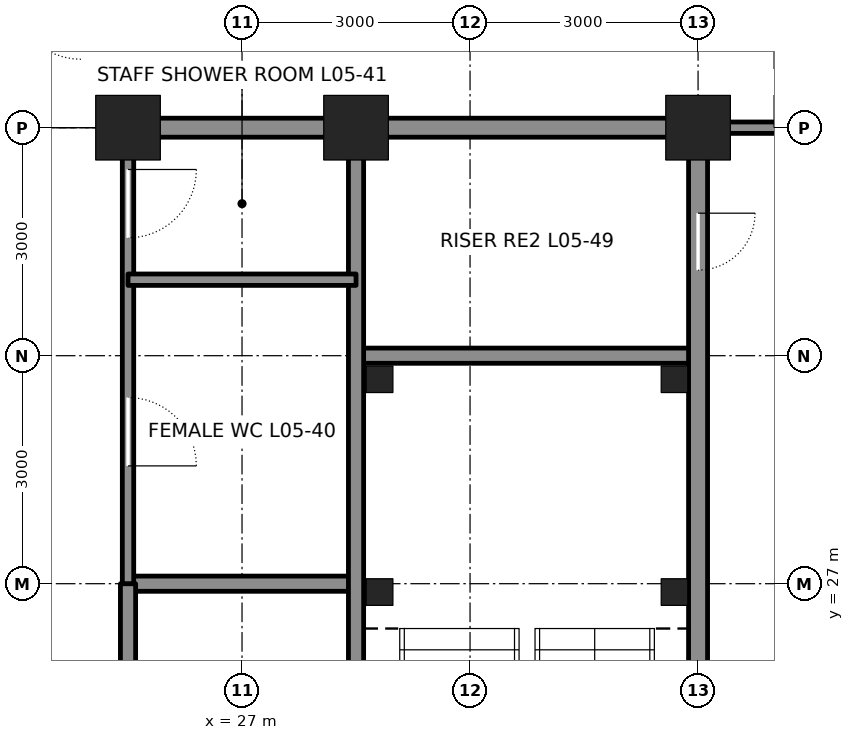
"""IFC4 building model, lengths in metres.
Left out: names, types, materials, properties, quantities, classifications, styles, units other than length and angle.
Written with IfcOpenShell. Run it as: python <this file> out.ifc"""

import sys

from ifc_helpers import new_model, si_unit, direction, frame, frame_2d, origin, origin_2d, place, context, subcontext, project, spatial, rectangle, hollow_rectangle, extrude, element, fill, save


model = new_model("IFC4")
c1 = context("Model", 3, precision=1e-05, world=origin(), true_north=direction((0.0, 1.0)))
c2 = subcontext(c1, "Body", "Model", "MODEL_VIEW")
j1 = project(units=[si_unit("LENGTHUNIT", "METRE"), si_unit("PLANEANGLEUNIT", "RADIAN")], contexts=[c1])
p1 = place(None, origin())
s1 = spatial("IfcSite", under=j1, at=p1, CompositionType="ELEMENT")
p2 = place(p1, origin())
s2 = spatial("IfcBuilding", under=s1, at=p2, CompositionType="ELEMENT")
p3 = place(p2, frame((0.0, 0.0, 28.8)))
s3 = spatial("IfcBuildingStorey", under=s2, at=p3, CompositionType="ELEMENT", Elevation=28.8)
for number, where, z_axis, x_axis in (
    (1, (25.5, 33.0, 0.0), (0.0, 0.0, 1.0), (1.0, 0.0, 0.0)),
    (2, (28.5, 33.0, 0.0), (0.0, 0.0, 1.0), (1.0, 0.0, 0.0)),
    (3, (33.0, 33.0, 0.0), (0.0, 0.0, 1.0), (1.0, 0.0, 0.0)),
):
    element("IfcColumn", number, at=place(p3, frame(where, z_axis=z_axis, x_axis=x_axis)), inside=s3, PredefinedType="COLUMN", context=c2, shape_type="SweptSolid", body=[
        extrude(hollow_rectangle(XDim=0.85, YDim=0.85, WallThickness=0.085, at=origin_2d()), origin(), (0.0, 0.0, 1.0), 4.5),
    ])
p4 = place(p3, frame((25.5, 27.0, 0.0), z_axis=(0.0, 0.0, 1.0), x_axis=(1.0, 0.0, 0.0)))
e4 = element("IfcWall", 4, at=p4, inside=s3, PredefinedType="SOLIDWALL", context=c2, shape_type="SweptSolid", body=[
    extrude(rectangle(XDim=3.0, YDim=0.2, at=frame_2d((1.5, 0.0))), origin(), (0.0, 0.0, 1.0), 4.34),
])
p5 = place(p3, frame((28.5, 30.0, 0.0), z_axis=(0.0, 0.0, 1.0), x_axis=(1.0, 0.0, 0.0)))
e5 = element("IfcWall", 5, at=p5, inside=s3, PredefinedType="SOLIDWALL", context=c2, shape_type="SweptSolid", body=[
    extrude(rectangle(XDim=4.5, YDim=0.2, at=frame_2d((2.25, 0.0))), origin(), (0.0, 0.0, 1.0), 4.34),
])
p6 = place(p3, frame((25.75, 33.0, 0.0), z_axis=(0.0, 0.0, 1.0), x_axis=(1.0, 0.0, 0.0)))
e6 = element("IfcWall", 6, at=p6, inside=s3, PredefinedType="SOLIDWALL", context=c2, shape_type="SweptSolid", body=[
    extrude(rectangle(XDim=2.5, YDim=0.25, at=frame_2d((1.25, 0.0))), origin(), (0.0, 0.0, 1.0), 3.181),
])
p7 = place(p3, frame((28.75, 33.0, 0.0), z_axis=(0.0, 0.0, 1.0), x_axis=(1.0, 0.0, 0.0)))
e7 = element("IfcWall", 7, at=p7, inside=s3, PredefinedType="SOLIDWALL", context=c2, shape_type="SweptSolid", body=[
    extrude(rectangle(XDim=4.0, YDim=0.25, at=frame_2d((2.0, 0.0))), origin(), (0.0, 0.0, 1.0), 3.181),
])
p8 = place(p3, frame((25.5, 15.0, 0.0), z_axis=(0.0, 0.0, 1.0), x_axis=(0.0, 1.0, 0.0)))
e8 = element("IfcWall", 8, at=p8, inside=s3, PredefinedType="SOLIDWALL", context=c2, shape_type="SweptSolid", body=[
    extrude(rectangle(XDim=12.0, YDim=0.2, at=frame_2d((6.0, 0.0))), origin(), (0.0, 0.0, 1.0), 3.365),
])
p9 = place(p3, frame((25.5, 27.0, 0.0), z_axis=(0.0, 0.0, 1.0), x_axis=(0.0, 1.0, 0.0)))
e9 = element("IfcWall", 9, at=p9, inside=s3, PredefinedType="PARTITIONING", context=c2, shape_type="SweptSolid", body=[
    extrude(rectangle(XDim=5.75, YDim=0.15, at=frame_2d((2.875, 0.0))), origin(), (0.0, 0.0, 1.0), 3.365),
])
p10 = place(p9, frame((1.55, 0.0, 0.0)))
e10 = element("IfcOpeningElement", 10, at=p10, cuts=e9, PredefinedType="OPENING", context=c2, shape_type="SweptSolid", body=[
    extrude(rectangle(XDim=0.9, YDim=2.1, at=frame_2d((0.45, 1.05))), frame((0.0, 0.085, 0.0), z_axis=(0.0, -1.0, 0.0), x_axis=(1.0, 0.0, 0.0)), (0.0, 0.0, 1.0), 0.17),
])
p11 = place(p9, frame((4.55, 0.0, 0.0)))
e11 = element("IfcOpeningElement", 11, at=p11, cuts=e9, PredefinedType="OPENING", context=c2, shape_type="SweptSolid", body=[
    extrude(rectangle(XDim=0.9, YDim=2.1, at=frame_2d((0.45, 1.05))), frame((0.0, 0.085, 0.0), z_axis=(0.0, -1.0, 0.0), x_axis=(1.0, 0.0, 0.0)), (0.0, 0.0, 1.0), 0.17),
])
p12 = place(p3, frame((28.5, 24.25, 0.0), z_axis=(0.0, 0.0, 1.0), x_axis=(0.0, 1.0, 0.0)))
e12 = element("IfcWall", 12, at=p12, inside=s3, PredefinedType="SOLIDWALL", context=c2, shape_type="SweptSolid", body=[
    extrude(rectangle(XDim=8.5, YDim=0.2, at=frame_2d((4.25, 0.0))), origin(), (0.0, 0.0, 1.0), 3.413),
])
p13 = place(p3, frame((33.0, 24.25, 0.0), z_axis=(0.0, 0.0, 1.0), x_axis=(0.0, 1.0, 0.0)))
e13 = element("IfcWall", 13, at=p13, inside=s3, PredefinedType="SOLIDWALL", context=c2, shape_type="SweptSolid", body=[
    extrude(rectangle(XDim=8.5, YDim=0.25, at=frame_2d((4.25, 0.0))), origin(), (0.0, 0.0, 1.0), 3.113),
])
p14 = place(p13, frame((6.875, 0.0, 0.0)))
e14 = element("IfcOpeningElement", 14, at=p14, cuts=e13, PredefinedType="OPENING", context=c2, shape_type="SweptSolid", body=[
    extrude(rectangle(XDim=0.75, YDim=2.1, at=frame_2d((0.375, 1.05))), frame((0.0, 0.135, 0.0), z_axis=(0.0, -1.0, 0.0), x_axis=(1.0, 0.0, 0.0)), (0.0, 0.0, 1.0), 0.27),
])
p15 = place(p3, frame((25.5, 31.0, 0.0), z_axis=(0.0, 0.0, 1.0), x_axis=(1.0, 0.0, 0.0)))
e15 = element("IfcWall", 15, at=p15, inside=s3, PredefinedType="PARTITIONING", context=c2, shape_type="SweptSolid", body=[
    extrude(rectangle(XDim=3.0, YDim=0.15, at=frame_2d((1.5, 0.0))), origin(), (0.0, 0.0, 1.0), 4.34),
])
p16 = place(p3, frame((33.0, 33.0, -0.3), z_axis=(0.0, 0.0, 1.0), x_axis=(1.0, 0.0, 0.0)))
e16 = element("IfcWall", 16, at=p16, inside=s3, PredefinedType="PARTITIONING", context=c2, shape_type="SweptSolid", body=[
    extrude(rectangle(XDim=3.0, YDim=0.15, at=frame_2d((1.5, 0.0))), origin(), (0.0, 0.0, 1.0), 3.481),
])
p17 = place(p16, frame((1.0, 0.0, 0.3)))
e17 = element("IfcOpeningElement", 17, at=p17, cuts=e16, PredefinedType="OPENING", context=c2, shape_type="SweptSolid", body=[
    extrude(rectangle(XDim=1.0, YDim=2.4, at=frame_2d((0.5, 1.2))), frame((0.0, 0.085, 0.0), z_axis=(0.0, -1.0, 0.0), x_axis=(1.0, 0.0, 0.0)), (0.0, 0.0, 1.0), 0.17),
])
for number, where, z_axis, x_axis in (
    (18, (28.81, 29.69, 0.0), (0.0, 0.0, 1.0), (1.0, 0.0, 0.0)),
    (19, (32.69, 29.69, 0.0), (0.0, 0.0, 1.0), (1.0, 0.0, 0.0)),
    (20, (28.81, 26.89, 0.0), (0.0, 0.0, 1.0), (1.0, 0.0, 0.0)),
    (21, (32.69, 26.89, 0.0), (0.0, 0.0, 1.0), (1.0, 0.0, 0.0)),
):
    element("IfcColumn", number, at=place(p3, frame(where, z_axis=z_axis, x_axis=x_axis)), inside=s3, PredefinedType="COLUMN", context=c2, shape_type="SweptSolid", body=[
        extrude(hollow_rectangle(XDim=0.35, YDim=0.35, WallThickness=0.035, at=origin_2d()), origin(), (0.0, 0.0, 1.0), 4.5),
    ])
p18 = place(p14, frame((0.75, 0.0, 0.0), z_axis=(0.0, 0.0, 1.0), x_axis=(-1.0, 0.0, 0.0)))
e22 = element("IfcDoor", 22, at=p18, inside=s3, OperationType="SINGLE_SWING_LEFT", PredefinedType="DOOR", context=c2, shape_type="SweptSolid", body=[
    extrude(rectangle(XDim=0.75, YDim=2.1, at=frame_2d((0.375, 1.05))), frame((0.0, 0.025, 0.0), z_axis=(0.0, -1.0, 0.0), x_axis=(1.0, 0.0, 0.0)), (0.0, 0.0, 1.0), 0.05),
])
fill(e14, e22)
p19 = place(p10, frame((0.9, 0.0, 0.0), z_axis=(0.0, 0.0, 1.0), x_axis=(-1.0, 0.0, 0.0)))
e23 = element("IfcDoor", 23, at=p19, inside=s3, OperationType="SINGLE_SWING_RIGHT", PredefinedType="DOOR", context=c2, shape_type="SweptSolid", body=[
    extrude(rectangle(XDim=0.9, YDim=2.1, at=frame_2d((0.45, 1.05))), frame((0.0, 0.025, 0.0), z_axis=(0.0, -1.0, 0.0), x_axis=(1.0, 0.0, 0.0)), (0.0, 0.0, 1.0), 0.05),
])
fill(e10, e23)
p20 = place(p11, frame((0.9, 0.0, 0.0), z_axis=(0.0, 0.0, 1.0), x_axis=(-1.0, 0.0, 0.0)))
e24 = element("IfcDoor", 24, at=p20, inside=s3, OperationType="SINGLE_SWING_LEFT", PredefinedType="DOOR", context=c2, shape_type="SweptSolid", body=[
    extrude(rectangle(XDim=0.9, YDim=2.1, at=frame_2d((0.45, 1.05))), frame((0.0, 0.025, 0.0), z_axis=(0.0, -1.0, 0.0), x_axis=(1.0, 0.0, 0.0)), (0.0, 0.0, 1.0), 0.05),
])
fill(e11, e24)
save(model, sys.argv[1])
